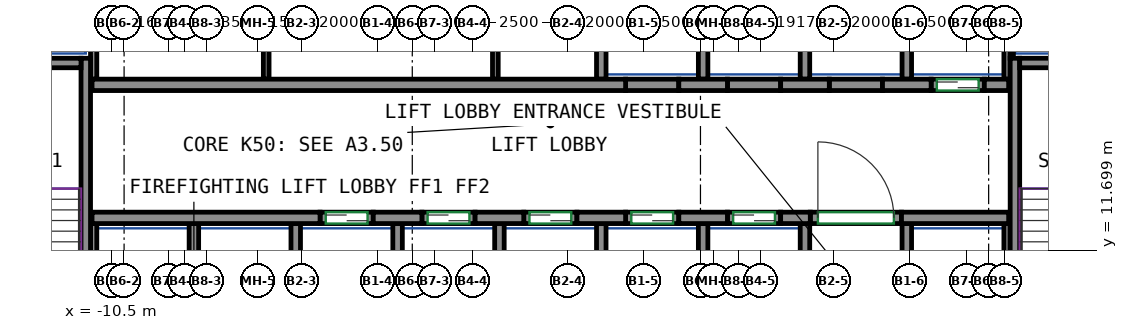
"""IFC4 building model, lengths in metres.
Left out: names, types, materials, properties, quantities, classifications, styles, units other than length and angle.
Written with IfcOpenShell. Run it as: python <this file> out.ifc"""

import sys

from ifc_helpers import new_model, si_unit, direction, frame, frame_2d, origin, place, context, subcontext, project, spatial, rectangle, extrude, source, transform, mapped, element, fill, save


model = new_model("IFC4")
c1 = context("Model", 3, precision=1e-05, world=origin(), true_north=direction((0.0, 1.0)))
c2 = subcontext(c1, "Body", "Model", "MODEL_VIEW")
j1 = project(units=[si_unit("LENGTHUNIT", "METRE"), si_unit("PLANEANGLEUNIT", "RADIAN")], contexts=[c1])
p1 = place(None, origin())
s1 = spatial("IfcSite", under=j1, at=p1, CompositionType="ELEMENT")
p2 = place(p1, origin())
s2 = spatial("IfcBuilding", under=s1, at=p2, CompositionType="ELEMENT")
p3 = place(p2, frame((0.0, 0.0, 203.3)))
s3 = spatial("IfcBuildingStorey", under=s2, at=p3, CompositionType="ELEMENT", Elevation=203.3)
m1 = source(origin(), c2, "Body", "SweptSolid", [
    extrude(rectangle(XDim=7.75, YDim=0.25, at=frame_2d((3.875, 0.0))), origin(), (0.0, 0.0, 1.0), 3.12),
])
p4 = place(p3, frame((-11.175, 9.0, 0.0), z_axis=(0.0, 0.0, 1.0), x_axis=(0.0, 1.0, 0.0)))
e1 = element("IfcWall", 1, at=p4, inside=s3, PredefinedType="SHEAR", context=c2, shape_type="MappedRepresentation", body=[
    mapped(m1, transform((0.0, 0.0, 0.0))),
])
m2 = source(origin(), c2, "Body", "SweptSolid", [
    extrude(rectangle(XDim=3.7, YDim=0.25, at=frame_2d((1.85, 0.0))), origin(), (0.0, 0.0, 1.0), 3.12),
])
p5 = place(p3, frame((-15.0, 16.625, 0.0), z_axis=(0.0, 0.0, 1.0), x_axis=(1.0, 0.0, 0.0)))
e2 = element("IfcWall", 2, at=p5, inside=s3, PredefinedType="SHEAR", context=c2, shape_type="MappedRepresentation", body=[
    mapped(m2, transform((0.0, 0.0, 0.0))),
])
p6 = place(p3, frame((13.275, 9.0, 0.0), z_axis=(0.0, 0.0, 1.0), x_axis=(0.0, 1.0, 0.0)))
e3 = element("IfcWall", 3, at=p6, inside=s3, PredefinedType="SHEAR", context=c2, shape_type="MappedRepresentation", body=[
    mapped(m1, transform((0.0, 0.0, 0.0))),
])
m3 = source(origin(), c2, "Body", "SweptSolid", [
    extrude(rectangle(XDim=3.7, YDim=0.25, at=frame_2d((1.85, 0.0))), origin(), (0.0, 0.0, 1.0), 3.12),
])
p7 = place(p3, frame((13.4, 16.625, 0.0), z_axis=(0.0, 0.0, 1.0), x_axis=(1.0, 0.0, 0.0)))
e4 = element("IfcWall", 4, at=p7, inside=s3, PredefinedType="SHEAR", context=c2, shape_type="MappedRepresentation", body=[
    mapped(m3, transform((0.0, 0.0, 0.0))),
])
m4 = source(origin(), c2, "Body", "SweptSolid", [
    extrude(rectangle(XDim=6.0, YDim=0.3, at=frame_2d((3.0, 0.0))), origin(), (0.0, 0.0, 1.0), 3.12),
])
p8 = place(p3, frame((-11.01, 12.55, 0.0), z_axis=(0.0, 0.0, 1.0), x_axis=(1.0, 0.0, 0.0)))
e5 = element("IfcWall", 5, at=p8, inside=s3, PredefinedType="SHEAR", context=c2, shape_type="MappedRepresentation", body=[
    mapped(m4, transform((0.0, 0.0, 0.0))),
])
m5 = source(origin(), c2, "Body", "SweptSolid", [
    extrude(rectangle(XDim=1.28, YDim=0.3, at=frame_2d((0.64, 0.0))), origin(), (0.0, 0.0, 1.0), 3.12),
])
for number, where, z_axis, x_axis in (
    (6, (-3.61, 12.55, 0.0), (0.0, 0.0, 1.0), (1.0, 0.0, 0.0)),
    (7, (-0.93, 12.55, 0.0), (0.0, 0.0, 1.0), (1.0, 0.0, 0.0)),
    (8, (1.75, 12.55, 0.0), (0.0, 0.0, 1.0), (1.0, 0.0, 0.0)),
    (9, (4.43, 12.55, 0.0), (0.0, 0.0, 1.0), (1.0, 0.0, 0.0)),
):
    element("IfcWall", number, at=place(p3, frame(where, z_axis=z_axis, x_axis=x_axis)), inside=s3, PredefinedType="SHEAR", context=c2, shape_type="MappedRepresentation", body=[
        mapped(m5, transform((0.0, 0.0, 0.0))),
    ])
m6 = source(origin(), c2, "Body", "SweptSolid", [
    extrude(rectangle(XDim=0.78, YDim=0.3, at=frame_2d((0.39, 0.0))), origin(), (0.0, 0.0, 1.0), 3.12),
])
p9 = place(p3, frame((7.11, 12.55, 0.0), z_axis=(0.0, 0.0, 1.0), x_axis=(1.0, 0.0, 0.0)))
e10 = element("IfcWall", 10, at=p9, inside=s3, PredefinedType="SHEAR", context=c2, shape_type="MappedRepresentation", body=[
    mapped(m6, transform((0.0, 0.0, 0.0))),
])
m7 = source(origin(), c2, "Body", "SweptSolid", [
    extrude(rectangle(XDim=2.82, YDim=0.3, at=frame_2d((1.41, 0.0))), origin(), (0.0, 0.0, 1.0), 3.12),
])
p10 = place(p3, frame((10.29, 12.55, 0.0), z_axis=(0.0, 0.0, 1.0), x_axis=(1.0, 0.0, 0.0)))
e11 = element("IfcWall", 11, at=p10, inside=s3, PredefinedType="SHEAR", context=c2, shape_type="MappedRepresentation", body=[
    mapped(m7, transform((0.0, 0.0, 0.0))),
])
m8 = source(origin(), c2, "Body", "SweptSolid", [
    extrude(rectangle(XDim=14.04, YDim=0.3, at=frame_2d((7.02, 0.0))), origin(), (0.0, 0.0, 1.0), 3.12),
])
p11 = place(p3, frame((-11.01, 16.05, 0.0), z_axis=(0.0, 0.0, 1.0), x_axis=(1.0, 0.0, 0.0)))
e12 = element("IfcWall", 12, at=p11, inside=s3, PredefinedType="SHEAR", context=c2, shape_type="MappedRepresentation", body=[
    mapped(m8, transform((0.0, 0.0, 0.0))),
])
p12 = place(p3, frame((4.43, 16.05, 0.0), z_axis=(0.0, 0.0, 1.0), x_axis=(1.0, 0.0, 0.0)))
e13 = element("IfcWall", 13, at=p12, inside=s3, PredefinedType="SHEAR", context=c2, shape_type="MappedRepresentation", body=[
    mapped(m5, transform((0.0, 0.0, 0.0))),
])
m9 = source(origin(), c2, "Body", "SweptSolid", [
    extrude(rectangle(XDim=1.28, YDim=0.3, at=frame_2d((0.64, 0.0))), origin(), (0.0, 0.0, 1.0), 3.12),
])
p13 = place(p3, frame((7.11, 16.05, 0.0), z_axis=(0.0, 0.0, 1.0), x_axis=(1.0, 0.0, 0.0)))
e14 = element("IfcWall", 14, at=p13, inside=s3, PredefinedType="SHEAR", context=c2, shape_type="MappedRepresentation", body=[
    mapped(m9, transform((0.0, 0.0, 0.0))),
])
p14 = place(p3, frame((9.79, 16.05, 0.0), z_axis=(0.0, 0.0, 1.0), x_axis=(1.0, 0.0, 0.0)))
e15 = element("IfcWall", 15, at=p14, inside=s3, PredefinedType="SHEAR", context=c2, shape_type="MappedRepresentation", body=[
    mapped(m5, transform((0.0, 0.0, 0.0))),
])
m10 = source(origin(), c2, "Body", "SweptSolid", [
    extrude(rectangle(XDim=0.64, YDim=0.3, at=frame_2d((0.32, 0.0))), origin(), (0.0, 0.0, 1.0), 3.12),
])
p15 = place(p3, frame((12.47, 16.05, 0.0), z_axis=(0.0, 0.0, 1.0), x_axis=(1.0, 0.0, 0.0)))
e16 = element("IfcWall", 16, at=p15, inside=s3, PredefinedType="SHEAR", context=c2, shape_type="MappedRepresentation", body=[
    mapped(m10, transform((0.0, 0.0, 0.0))),
])
m11 = source(origin(), c2, "Body", "SweptSolid", [
    extrude(rectangle(XDim=1.4, YDim=0.3, at=frame_2d((0.7, 0.0))), origin(), (0.0, 0.0, 1.0), 3.12),
])
p16 = place(p3, frame((-5.01, 12.55, 0.0), z_axis=(0.0, 0.0, 1.0), x_axis=(1.0, 0.0, 0.0)))
e17 = element("IfcWall", 17, at=p16, inside=s3, PredefinedType="PARTITIONING", context=c2, shape_type="MappedRepresentation", body=[
    mapped(m11, transform((0.0, 0.0, 0.0))),
])
p17 = place(p16, frame((0.15, 0.0, 0.0)))
e18 = element("IfcOpeningElement", 18, at=p17, cuts=e17, PredefinedType="OPENING", context=c2, shape_type="SweptSolid", body=[
    extrude(rectangle(XDim=1.1, YDim=2.1, at=frame_2d((0.55, 1.05))), frame((0.0, 0.16, 0.0), z_axis=(0.0, -1.0, 0.0), x_axis=(1.0, 0.0, 0.0)), (0.0, 0.0, 1.0), 0.32),
])
m12 = source(origin(), c2, "Body", "SweptSolid", [
    extrude(rectangle(XDim=1.4, YDim=0.3, at=frame_2d((0.7, 0.0))), origin(), (0.0, 0.0, 1.0), 3.12),
])
p18 = place(p3, frame((-2.33, 12.55, 0.0), z_axis=(0.0, 0.0, 1.0), x_axis=(1.0, 0.0, 0.0)))
e19 = element("IfcWall", 19, at=p18, inside=s3, PredefinedType="PARTITIONING", context=c2, shape_type="MappedRepresentation", body=[
    mapped(m12, transform((0.0, 0.0, 0.0))),
])
p19 = place(p18, frame((0.15, 0.0, 0.0)))
e20 = element("IfcOpeningElement", 20, at=p19, cuts=e19, PredefinedType="OPENING", context=c2, shape_type="SweptSolid", body=[
    extrude(rectangle(XDim=1.1, YDim=2.1, at=frame_2d((0.55, 1.05))), frame((0.0, 0.16, 0.0), z_axis=(0.0, -1.0, 0.0), x_axis=(1.0, 0.0, 0.0)), (0.0, 0.0, 1.0), 0.32),
])
p20 = place(p3, frame((0.35, 12.55, 0.0), z_axis=(0.0, 0.0, 1.0), x_axis=(1.0, 0.0, 0.0)))
e21 = element("IfcWall", 21, at=p20, inside=s3, PredefinedType="PARTITIONING", context=c2, shape_type="MappedRepresentation", body=[
    mapped(m11, transform((0.0, 0.0, 0.0))),
])
p21 = place(p20, frame((0.15, 0.0, 0.0)))
e22 = element("IfcOpeningElement", 22, at=p21, cuts=e21, PredefinedType="OPENING", context=c2, shape_type="SweptSolid", body=[
    extrude(rectangle(XDim=1.1, YDim=2.1, at=frame_2d((0.55, 1.05))), frame((0.0, 0.16, 0.0), z_axis=(0.0, -1.0, 0.0), x_axis=(1.0, 0.0, 0.0)), (0.0, 0.0, 1.0), 0.32),
])
p22 = place(p3, frame((3.03, 12.55, 0.0), z_axis=(0.0, 0.0, 1.0), x_axis=(1.0, 0.0, 0.0)))
e23 = element("IfcWall", 23, at=p22, inside=s3, PredefinedType="PARTITIONING", context=c2, shape_type="MappedRepresentation", body=[
    mapped(m11, transform((0.0, 0.0, 0.0))),
])
p23 = place(p22, frame((0.15, 0.0, 0.0)))
e24 = element("IfcOpeningElement", 24, at=p23, cuts=e23, PredefinedType="OPENING", context=c2, shape_type="SweptSolid", body=[
    extrude(rectangle(XDim=1.1, YDim=2.1, at=frame_2d((0.55, 1.05))), frame((0.0, 0.16, 0.0), z_axis=(0.0, -1.0, 0.0), x_axis=(1.0, 0.0, 0.0)), (0.0, 0.0, 1.0), 0.32),
])
p24 = place(p3, frame((5.71, 12.55, 0.0), z_axis=(0.0, 0.0, 1.0), x_axis=(1.0, 0.0, 0.0)))
e25 = element("IfcWall", 25, at=p24, inside=s3, PredefinedType="PARTITIONING", context=c2, shape_type="MappedRepresentation", body=[
    mapped(m12, transform((0.0, 0.0, 0.0))),
])
p25 = place(p24, frame((0.15, 0.0, 0.0)))
e26 = element("IfcOpeningElement", 26, at=p25, cuts=e25, PredefinedType="OPENING", context=c2, shape_type="SweptSolid", body=[
    extrude(rectangle(XDim=1.1, YDim=2.1, at=frame_2d((0.55, 1.05))), frame((0.0, 0.16, 0.0), z_axis=(0.0, -1.0, 0.0), x_axis=(1.0, 0.0, 0.0)), (0.0, 0.0, 1.0), 0.32),
])
p26 = place(p3, frame((11.07, 16.05, 0.0), z_axis=(0.0, 0.0, 1.0), x_axis=(1.0, 0.0, 0.0)))
e27 = element("IfcWall", 27, at=p26, inside=s3, PredefinedType="PARTITIONING", context=c2, shape_type="MappedRepresentation", body=[
    mapped(m11, transform((0.0, 0.0, 0.0))),
])
p27 = place(p26, frame((0.15, 0.0, 0.0)))
e28 = element("IfcOpeningElement", 28, at=p27, cuts=e27, PredefinedType="OPENING", context=c2, shape_type="SweptSolid", body=[
    extrude(rectangle(XDim=1.1, YDim=2.1, at=frame_2d((0.55, 1.05))), frame((0.0, 0.16, 0.0), z_axis=(0.0, -1.0, 0.0), x_axis=(1.0, 0.0, 0.0)), (0.0, 0.0, 1.0), 0.32),
])
m13 = source(origin(), c2, "Body", "SweptSolid", [
    extrude(rectangle(XDim=2.4, YDim=0.3, at=frame_2d((1.2, 0.0))), origin(), (0.0, 0.0, 1.0), 3.12),
])
p28 = place(p3, frame((7.89, 12.55, 0.0), z_axis=(0.0, 0.0, 1.0), x_axis=(1.0, 0.0, 0.0)))
e29 = element("IfcWall", 29, at=p28, inside=s3, PredefinedType="PARTITIONING", context=c2, shape_type="MappedRepresentation", body=[
    mapped(m13, transform((0.0, 0.0, 0.0))),
])
p29 = place(p28, frame((0.2, 0.0, 0.0)))
e30 = element("IfcOpeningElement", 30, at=p29, cuts=e29, PredefinedType="OPENING", context=c2, shape_type="SweptSolid", body=[
    extrude(rectangle(XDim=2.0, YDim=2.1, at=frame_2d((1.0, 1.05))), frame((0.0, 0.16, 0.0), z_axis=(0.0, -1.0, 0.0), x_axis=(1.0, 0.0, 0.0)), (0.0, 0.0, 1.0), 0.32),
])
p30 = place(p3, frame((3.03, 16.05, 0.0), z_axis=(0.0, 0.0, 1.0), x_axis=(1.0, 0.0, 0.0)))
e31 = element("IfcWall", 31, at=p30, inside=s3, PredefinedType="PARTITIONING", context=c2, shape_type="MappedRepresentation", body=[
    mapped(m11, transform((0.0, 0.0, 0.0))),
])
for number, where, z_axis, x_axis in (
    (32, (5.71, 16.05, 0.0), (0.0, 0.0, 1.0), (1.0, 0.0, 0.0)),
    (33, (8.39, 16.05, 0.0), (0.0, 0.0, 1.0), (1.0, 0.0, 0.0)),
):
    element("IfcWall", number, at=place(p3, frame(where, z_axis=z_axis, x_axis=x_axis)), inside=s3, PredefinedType="PARTITIONING", context=c2, shape_type="MappedRepresentation", body=[
        mapped(m12, transform((0.0, 0.0, 0.0))),
    ])
m14 = source(origin(), c2, "Body", "SweptSolid", [
    extrude(rectangle(XDim=3.275, YDim=0.165, at=frame_2d((1.638, 0.0))), origin(), (0.0, 0.0, 1.0), 3.12),
])
p31 = place(p3, frame((13.067, 16.2, 0.0), z_axis=(0.0, 0.0, 1.0), x_axis=(0.0, 1.0, 0.0)))
e34 = element("IfcWall", 34, at=p31, inside=s3, PredefinedType="PARTITIONING", context=c2, shape_type="MappedRepresentation", body=[
    mapped(m14, transform((0.0, 0.0, 0.0))),
])
m15 = source(origin(), c2, "Body", "SweptSolid", [
    extrude(rectangle(XDim=4.8, YDim=0.165, at=frame_2d((2.4, 0.0))), origin(), (0.0, 0.0, 1.0), 3.12),
])
p32 = place(p3, frame((-10.968, 16.2, 0.0), z_axis=(0.0, 0.0, 1.0), x_axis=(0.0, 1.0, 0.0)))
e35 = element("IfcWall", 35, at=p32, inside=s3, PredefinedType="PARTITIONING", context=c2, shape_type="MappedRepresentation", body=[
    mapped(m15, transform((0.0, 0.0, 0.0))),
])
m16 = source(origin(), c2, "Body", "SweptSolid", [
    extrude(rectangle(XDim=3.275, YDim=0.25, at=frame_2d((1.638, 0.0))), origin(), (0.0, 0.0, 1.0), 3.12),
])
p33 = place(p3, frame((10.43, 16.2, 0.0), z_axis=(0.0, 0.0, 1.0), x_axis=(0.0, 1.0, 0.0)))
e36 = element("IfcWall", 36, at=p33, inside=s3, PredefinedType="PARTITIONING", context=c2, shape_type="MappedRepresentation", body=[
    mapped(m16, transform((0.0, 0.0, 0.0))),
])
m17 = source(origin(), c2, "Body", "SweptSolid", [
    extrude(rectangle(XDim=2.725, YDim=0.085, at=frame_2d((1.363, 0.0))), origin(), (0.0, 0.0, 1.0), 3.12),
])
p34 = place(p3, frame((13.192, 16.75, 0.0), z_axis=(0.0, 0.0, 1.0), x_axis=(0.0, 1.0, 0.0)))
e37 = element("IfcWall", 37, at=p34, inside=s3, PredefinedType="PARTITIONING", context=c2, shape_type="MappedRepresentation", body=[
    mapped(m17, transform((0.0, 0.0, 0.0))),
])
for number, where, z_axis, x_axis in (
    (38, (2.39, 16.2, 0.0), (0.0, 0.0, 1.0), (0.0, 1.0, 0.0)),
    (39, (5.07, 16.2, 0.0), (0.0, 0.0, 1.0), (0.0, 1.0, 0.0)),
    (40, (7.75, 16.2, 0.0), (0.0, 0.0, 1.0), (0.0, 1.0, 0.0)),
):
    element("IfcWall", number, at=place(p3, frame(where, z_axis=z_axis, x_axis=x_axis)), inside=s3, PredefinedType="PARTITIONING", context=c2, shape_type="MappedRepresentation", body=[
        mapped(m16, transform((0.0, 0.0, 0.0))),
    ])
m18 = source(origin(), c2, "Body", "SweptSolid", [
    extrude(rectangle(XDim=3.4, YDim=0.25, at=frame_2d((1.7, 0.0))), origin(), (0.0, 0.0, 1.0), 3.12),
])
p35 = place(p3, frame((10.43, 9.0, 0.0), z_axis=(0.0, 0.0, 1.0), x_axis=(0.0, 1.0, 0.0)))
e41 = element("IfcWall", 41, at=p35, inside=s3, PredefinedType="PARTITIONING", context=c2, shape_type="MappedRepresentation", body=[
    mapped(m18, transform((0.0, 0.0, 0.0))),
])
m19 = source(origin(), c2, "Body", "SweptSolid", [
    extrude(rectangle(XDim=3.4, YDim=0.165, at=frame_2d((1.7, 0.0))), origin(), (0.0, 0.0, 1.0), 3.12),
])
p36 = place(p3, frame((13.067, 9.0, 0.0), z_axis=(0.0, 0.0, 1.0), x_axis=(0.0, 1.0, 0.0)))
e42 = element("IfcWall", 42, at=p36, inside=s3, PredefinedType="PARTITIONING", context=c2, shape_type="MappedRepresentation", body=[
    mapped(m19, transform((0.0, 0.0, 0.0))),
])
for number, where, z_axis, x_axis in (
    (43, (2.39, 9.0, 0.0), (0.0, 0.0, 1.0), (0.0, 1.0, 0.0)),
    (44, (5.07, 9.0, 0.0), (0.0, 0.0, 1.0), (0.0, 1.0, 0.0)),
    (45, (7.75, 9.0, 0.0), (0.0, 0.0, 1.0), (0.0, 1.0, 0.0)),
    (46, (-0.29, 9.0, 0.0), (0.0, 0.0, 1.0), (0.0, 1.0, 0.0)),
):
    element("IfcWall", number, at=place(p3, frame(where, z_axis=z_axis, x_axis=x_axis)), inside=s3, PredefinedType="PARTITIONING", context=c2, shape_type="MappedRepresentation", body=[
        mapped(m18, transform((0.0, 0.0, 0.0))),
    ])
p37 = place(p3, frame((-10.968, 9.0, 0.0), z_axis=(0.0, 0.0, 1.0), x_axis=(0.0, 1.0, 0.0)))
e47 = element("IfcWall", 47, at=p37, inside=s3, PredefinedType="PARTITIONING", context=c2, shape_type="MappedRepresentation", body=[
    mapped(m19, transform((0.0, 0.0, 0.0))),
])
for number, where, z_axis, x_axis in (
    (48, (-2.97, 9.0, 0.0), (0.0, 0.0, 1.0), (0.0, 1.0, 0.0)),
    (49, (-5.65, 9.0, 0.0), (0.0, 0.0, 1.0), (0.0, 1.0, 0.0)),
    (50, (-8.33, 9.0, 0.0), (0.0, 0.0, 1.0), (0.0, 1.0, 0.0)),
):
    element("IfcWall", number, at=place(p3, frame(where, z_axis=z_axis, x_axis=x_axis)), inside=s3, PredefinedType="PARTITIONING", context=c2, shape_type="MappedRepresentation", body=[
        mapped(m18, transform((0.0, 0.0, 0.0))),
    ])
m20 = source(origin(), c2, "Body", "SweptSolid", [
    extrude(rectangle(XDim=4.8, YDim=0.15, at=frame_2d((2.4, 0.0))), origin(), (0.0, 0.0, 1.0), 3.12),
])
for number, where, z_axis, x_axis in (
    (51, (-6.427, 16.2, 0.0), (0.0, 0.0, 1.0), (0.0, 1.0, 0.0)),
    (52, (-0.397, 16.2, 0.0), (0.0, 0.0, 1.0), (0.0, 1.0, 0.0)),
):
    element("IfcWall", number, at=place(p3, frame(where, z_axis=z_axis, x_axis=x_axis)), inside=s3, PredefinedType="PARTITIONING", context=c2, shape_type="MappedRepresentation", body=[
        mapped(m20, transform((0.0, 0.0, 0.0))),
    ])
p38 = place(p29, origin())
e53 = element("IfcDoor", 53, at=p38, inside=s3, OperationType="DOUBLE_DOOR_SINGLE_SWING", PredefinedType="DOOR", context=c2, shape_type="SweptSolid", body=[
    extrude(rectangle(XDim=2.0, YDim=2.1, at=frame_2d((1.0, 1.05))), frame((0.0, 0.025, 0.0), z_axis=(0.0, -1.0, 0.0), x_axis=(1.0, 0.0, 0.0)), (0.0, 0.0, 1.0), 0.05),
])
fill(e30, e53)
p39 = place(p17, origin())
e54 = element("IfcDoor", 54, at=p39, inside=s3, OperationType="DOUBLE_DOOR_SLIDING", PredefinedType="DOOR", context=c2, shape_type="SweptSolid", body=[
    extrude(rectangle(XDim=1.1, YDim=2.1, at=frame_2d((0.55, 1.05))), frame((0.0, 0.025, 0.0), z_axis=(0.0, -1.0, 0.0), x_axis=(1.0, 0.0, 0.0)), (0.0, 0.0, 1.0), 0.05),
])
fill(e18, e54)
p40 = place(p19, origin())
e55 = element("IfcDoor", 55, at=p40, inside=s3, OperationType="DOUBLE_DOOR_SLIDING", PredefinedType="DOOR", context=c2, shape_type="SweptSolid", body=[
    extrude(rectangle(XDim=1.1, YDim=2.1, at=frame_2d((0.55, 1.05))), frame((0.0, 0.025, 0.0), z_axis=(0.0, -1.0, 0.0), x_axis=(1.0, 0.0, 0.0)), (0.0, 0.0, 1.0), 0.05),
])
fill(e20, e55)
p41 = place(p21, origin())
e56 = element("IfcDoor", 56, at=p41, inside=s3, OperationType="DOUBLE_DOOR_SLIDING", PredefinedType="DOOR", context=c2, shape_type="SweptSolid", body=[
    extrude(rectangle(XDim=1.1, YDim=2.1, at=frame_2d((0.55, 1.05))), frame((0.0, 0.025, 0.0), z_axis=(0.0, -1.0, 0.0), x_axis=(1.0, 0.0, 0.0)), (0.0, 0.0, 1.0), 0.05),
])
fill(e22, e56)
p42 = place(p23, origin())
e57 = element("IfcDoor", 57, at=p42, inside=s3, OperationType="DOUBLE_DOOR_SLIDING", PredefinedType="DOOR", context=c2, shape_type="SweptSolid", body=[
    extrude(rectangle(XDim=1.1, YDim=2.1, at=frame_2d((0.55, 1.05))), frame((0.0, 0.025, 0.0), z_axis=(0.0, -1.0, 0.0), x_axis=(1.0, 0.0, 0.0)), (0.0, 0.0, 1.0), 0.05),
])
fill(e24, e57)
p43 = place(p25, origin())
e58 = element("IfcDoor", 58, at=p43, inside=s3, OperationType="DOUBLE_DOOR_SLIDING", PredefinedType="DOOR", context=c2, shape_type="SweptSolid", body=[
    extrude(rectangle(XDim=1.1, YDim=2.1, at=frame_2d((0.55, 1.05))), frame((0.0, 0.025, 0.0), z_axis=(0.0, -1.0, 0.0), x_axis=(1.0, 0.0, 0.0)), (0.0, 0.0, 1.0), 0.05),
])
fill(e26, e58)
p44 = place(p27, origin())
e59 = element("IfcDoor", 59, at=p44, inside=s3, OperationType="DOUBLE_DOOR_SLIDING", PredefinedType="DOOR", context=c2, shape_type="SweptSolid", body=[
    extrude(rectangle(XDim=1.1, YDim=2.1, at=frame_2d((0.55, 1.05))), frame((0.0, 0.025, 0.0), z_axis=(0.0, -1.0, 0.0), x_axis=(1.0, 0.0, 0.0)), (0.0, 0.0, 1.0), 0.05),
])
fill(e28, e59)
save(model, sys.argv[1])
